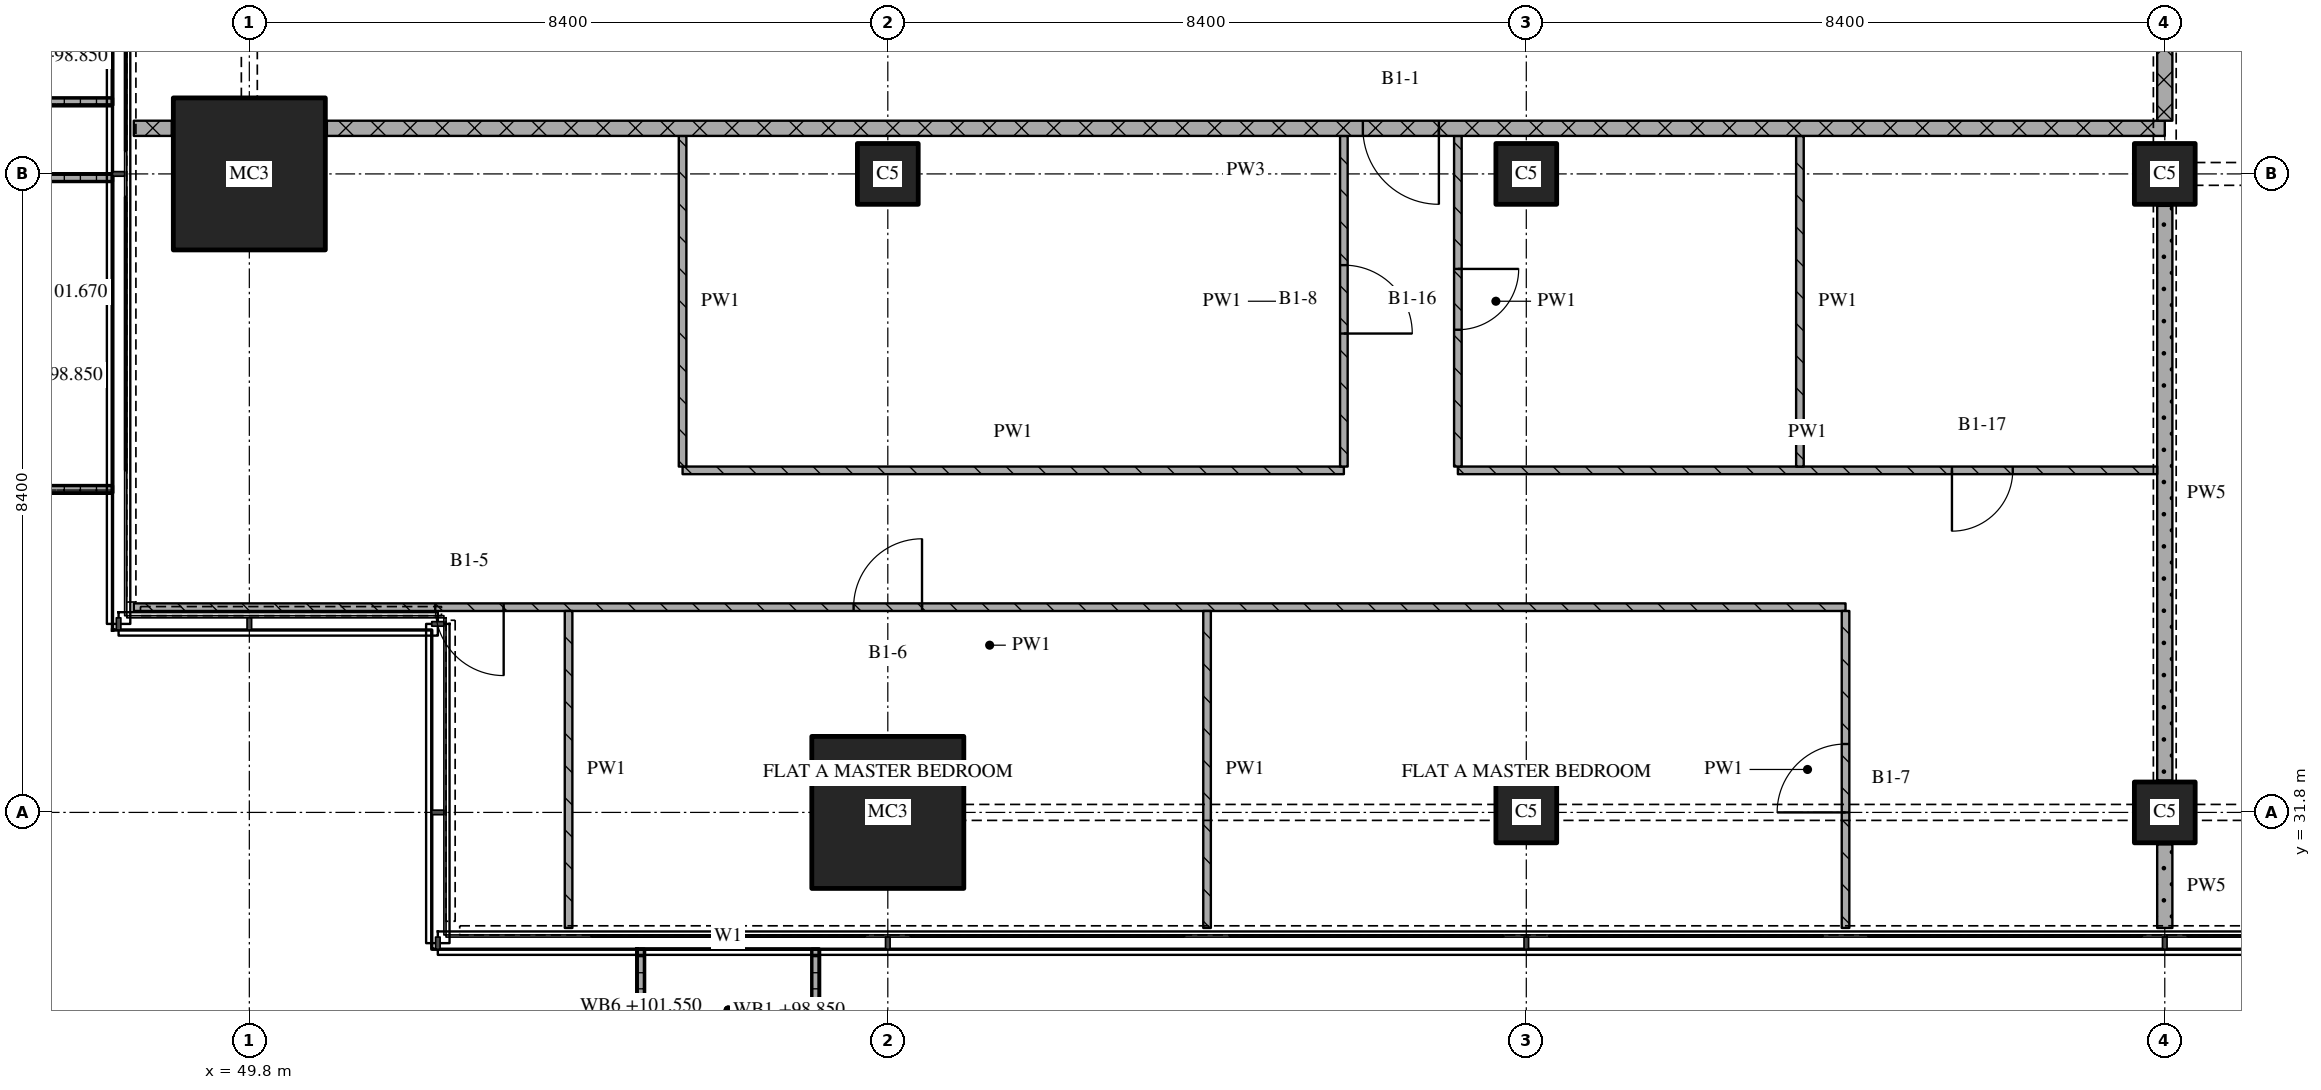
"""IFC4 building model, lengths in metres.
Left out: names, types, materials, properties, quantities, classifications, styles, units other than length and angle.
Written with IfcOpenShell. Run it as: python <this file> out.ifc"""

import sys

from ifc_helpers import new_model, si_unit, direction, frame, frame_2d, origin, origin_2d, place, context, subcontext, project, spatial, polyline, rectangle, outline, extrude, element, fill, save


model = new_model("IFC4")
c1 = context("Model", 3, precision=1e-05, world=origin(), true_north=direction((0.0, 1.0)))
c2 = subcontext(c1, "Body", "Model", "MODEL_VIEW")
j1 = project(units=[si_unit("LENGTHUNIT", "METRE"), si_unit("PLANEANGLEUNIT", "RADIAN")], contexts=[c1])
p1 = place(None, origin())
s1 = spatial("IfcSite", under=j1, at=p1, CompositionType="ELEMENT")
p2 = place(p1, origin())
s2 = spatial("IfcBuilding", under=s1, at=p2, CompositionType="ELEMENT")
p3 = place(p2, frame((0.0, 0.0, 98.85)))
s3 = spatial("IfcBuildingStorey", under=s2, at=p3, CompositionType="ELEMENT", Elevation=98.85)
for number, where, z_axis, x_axis in (
    (1, (49.8, 40.2, 0.0), (0.0, 0.0, 1.0), (1.0, 0.0, 0.0)),
    (2, (58.2, 31.8, 0.0), (0.0, 0.0, 1.0), (1.0, 0.0, 0.0)),
):
    element("IfcColumn", number, at=place(p3, frame(where, z_axis=z_axis, x_axis=x_axis)), inside=s3, PredefinedType="COLUMN", context=c2, shape_type="SweptSolid", body=[
        extrude(rectangle(XDim=2.0, YDim=2.0, at=origin_2d()), origin(), (0.0, 0.0, 1.0), 3.6),
    ])
for number, where, z_axis, x_axis in (
    (3, (58.2, 40.2, 0.0), (0.0, 0.0, 1.0), (1.0, 0.0, 0.0)),
    (4, (66.6, 31.8, 0.0), (0.0, 0.0, 1.0), (1.0, 0.0, 0.0)),
    (5, (66.6, 40.2, 0.0), (0.0, 0.0, 1.0), (1.0, 0.0, 0.0)),
    (6, (75.0, 31.8, 0.0), (0.0, 0.0, 1.0), (1.0, 0.0, 0.0)),
    (7, (75.0, 40.2, 0.0), (0.0, 0.0, 1.0), (1.0, 0.0, 0.0)),
):
    element("IfcColumn", number, at=place(p3, frame(where, z_axis=z_axis, x_axis=x_axis)), inside=s3, PredefinedType="COLUMN", context=c2, shape_type="SweptSolid", body=[
        extrude(rectangle(XDim=0.8, YDim=0.8, at=origin_2d()), origin(), (0.0, 0.0, 1.0), 3.6),
    ])
p4 = place(p3, origin())
e8 = element("IfcWall", 8, at=p4, inside=s3, PredefinedType="SOLIDWALL", context=c2, shape_type="SweptSolid", body=[
    extrude(outline(polyline([(54.9, 30.0), (55.0, 30.0), (55.0, 28.5), (57.2, 28.5), (57.2, 30.0), (57.3, 30.0), (57.3, 28.4), (54.9, 28.4), (54.9, 30.0)])), origin(), (0.0, 0.0, 1.0), 1.0),
])
p5 = place(p3, origin())
e9 = element("IfcWall", 9, at=p5, inside=s3, PredefinedType="SOLIDWALL", context=c2, shape_type="SweptSolid", body=[
    extrude(outline(polyline([(48.0, 43.5), (48.0, 43.4), (46.5, 43.4), (46.5, 41.2), (48.0, 41.2), (48.0, 41.1), (46.4, 41.1), (46.4, 43.5), (48.0, 43.5)])), origin(), (0.0, 0.0, 1.0), 1.0),
])
p6 = place(p3, origin())
e10 = element("IfcWall", 10, at=p6, inside=s3, PredefinedType="SOLIDWALL", context=c2, shape_type="SweptSolid", body=[
    extrude(outline(polyline([(48.0, 40.2), (48.0, 40.1), (46.367, 40.1), (46.367, 36.1), (48.0, 36.1), (48.0, 36.0), (46.267, 36.0), (46.267, 40.2), (48.0, 40.2)])), origin(), (0.0, 0.0, 1.0), 1.0),
])
p7 = place(p3, frame((70.8, 34.5, 0.0), z_axis=(0.0, 0.0, 1.0), x_axis=(-1.0, 0.0, 0.0)))
e11 = element("IfcWall", 11, at=p7, inside=s3, PredefinedType="PARTITIONING", context=c2, shape_type="SweptSolid", body=[
    extrude(rectangle(XDim=22.52, YDim=0.1, at=frame_2d((11.26, 0.0))), origin(), (0.0, 0.0, 1.0), 3.32),
])
p8 = place(p7, frame((12.15, 0.0, 0.0)))
e12 = element("IfcOpeningElement", 12, at=p8, cuts=e11, PredefinedType="OPENING", context=c2, shape_type="SweptSolid", body=[
    extrude(rectangle(XDim=0.9, YDim=2.1, at=frame_2d((0.45, 1.05))), frame((0.0, 0.06, 0.0), z_axis=(0.0, -1.0, 0.0), x_axis=(1.0, 0.0, 0.0)), (0.0, 0.0, 1.0), 0.12),
])
p9 = place(p7, frame((17.654, 0.0, 0.0)))
e13 = element("IfcOpeningElement", 13, at=p9, cuts=e11, PredefinedType="OPENING", context=c2, shape_type="SweptSolid", body=[
    extrude(rectangle(XDim=0.9, YDim=2.1, at=frame_2d((0.45, 1.05))), frame((0.0, 0.06, 0.0), z_axis=(0.0, -1.0, 0.0), x_axis=(1.0, 0.0, 0.0)), (0.0, 0.0, 1.0), 0.12),
])
p10 = place(p3, frame((55.5, 36.3, 0.0), z_axis=(0.0, 0.0, 1.0), x_axis=(1.0, 0.0, 0.0)))
e14 = element("IfcWall", 14, at=p10, inside=s3, PredefinedType="PARTITIONING", context=c2, shape_type="SweptSolid", body=[
    extrude(rectangle(XDim=8.7, YDim=0.1, at=frame_2d((4.35, 0.0))), origin(), (0.0, 0.0, 1.0), 3.32),
])
p11 = place(p3, frame((65.7, 36.3, 0.0), z_axis=(0.0, 0.0, 1.0), x_axis=(1.0, 0.0, 0.0)))
e15 = element("IfcWall", 15, at=p11, inside=s3, PredefinedType="PARTITIONING", context=c2, shape_type="SweptSolid", body=[
    extrude(rectangle(XDim=9.2, YDim=0.1, at=frame_2d((4.6, 0.0))), origin(), (0.0, 0.0, 1.0), 3.32),
])
p12 = place(p11, frame((6.5, 0.0, 0.0)))
e16 = element("IfcOpeningElement", 16, at=p12, cuts=e15, PredefinedType="OPENING", context=c2, shape_type="SweptSolid", body=[
    extrude(rectangle(XDim=0.8, YDim=2.1, at=frame_2d((0.4, 1.05))), frame((0.0, 0.06, 0.0), z_axis=(0.0, -1.0, 0.0), x_axis=(1.0, 0.0, 0.0)), (0.0, 0.0, 1.0), 0.12),
])
p13 = place(p3, frame((48.28, 40.8, 0.0), z_axis=(0.0, 0.0, 1.0), x_axis=(1.0, 0.0, 0.0)))
e17 = element("IfcWall", 17, at=p13, inside=s3, PredefinedType="PARTITIONING", context=c2, shape_type="SweptSolid", body=[
    extrude(rectangle(XDim=0.5, YDim=0.2, at=frame_2d((0.25, 0.0))), origin(), (0.0, 0.0, 1.0), 3.32),
])
p14 = place(p3, frame((75.0, 40.8, 0.0), z_axis=(0.0, 0.0, 1.0), x_axis=(-1.0, 0.0, 0.0)))
e18 = element("IfcWall", 18, at=p14, inside=s3, PredefinedType="PARTITIONING", context=c2, shape_type="SweptSolid", body=[
    extrude(rectangle(XDim=24.18, YDim=0.2, at=frame_2d((12.09, 0.0))), origin(), (0.0, 0.0, 1.0), 3.32),
])
p15 = place(p14, frame((9.55, 0.0, 0.0)))
e19 = element("IfcOpeningElement", 19, at=p15, cuts=e18, PredefinedType="OPENING", context=c2, shape_type="SweptSolid", body=[
    extrude(rectangle(XDim=1.0, YDim=2.1, at=frame_2d((0.5, 1.05))), frame((0.0, 0.11, 0.0), z_axis=(0.0, -1.0, 0.0), x_axis=(1.0, 0.0, 0.0)), (0.0, 0.0, 1.0), 0.22),
])
p16 = place(p3, frame((54.0, 34.45, 0.0), z_axis=(0.0, 0.0, 1.0), x_axis=(0.0, -1.0, 0.0)))
e20 = element("IfcWall", 20, at=p16, inside=s3, PredefinedType="PARTITIONING", context=c2, shape_type="SweptSolid", body=[
    extrude(rectangle(XDim=4.17, YDim=0.1, at=frame_2d((2.085, 0.0))), origin(), (0.0, 0.0, 1.0), 3.32),
])
p17 = place(p3, frame((55.5, 40.7, 0.0), z_axis=(0.0, 0.0, 1.0), x_axis=(0.0, -1.0, 0.0)))
e21 = element("IfcWall", 21, at=p17, inside=s3, PredefinedType="PARTITIONING", context=c2, shape_type="SweptSolid", body=[
    extrude(rectangle(XDim=4.35, YDim=0.1, at=frame_2d((2.175, 0.0))), origin(), (0.0, 0.0, 1.0), 3.32),
])
p18 = place(p3, frame((62.4, 34.45, 0.0), z_axis=(0.0, 0.0, 1.0), x_axis=(0.0, -1.0, 0.0)))
e22 = element("IfcWall", 22, at=p18, inside=s3, PredefinedType="PARTITIONING", context=c2, shape_type="SweptSolid", body=[
    extrude(rectangle(XDim=4.17, YDim=0.1, at=frame_2d((2.085, 0.0))), origin(), (0.0, 0.0, 1.0), 3.32),
])
p19 = place(p3, frame((64.2, 36.35, 0.0), z_axis=(0.0, 0.0, 1.0), x_axis=(0.0, 1.0, 0.0)))
e23 = element("IfcWall", 23, at=p19, inside=s3, PredefinedType="PARTITIONING", context=c2, shape_type="SweptSolid", body=[
    extrude(rectangle(XDim=4.35, YDim=0.1, at=frame_2d((2.175, 0.0))), origin(), (0.0, 0.0, 1.0), 3.32),
])
p20 = place(p19, frame((1.75, 0.0, 0.0)))
e24 = element("IfcOpeningElement", 24, at=p20, cuts=e23, PredefinedType="OPENING", context=c2, shape_type="SweptSolid", body=[
    extrude(rectangle(XDim=0.9, YDim=2.1, at=frame_2d((0.45, 1.05))), frame((0.0, 0.06, 0.0), z_axis=(0.0, -1.0, 0.0), x_axis=(1.0, 0.0, 0.0)), (0.0, 0.0, 1.0), 0.12),
])
p21 = place(p3, frame((65.7, 40.7, 0.0), z_axis=(0.0, 0.0, 1.0), x_axis=(0.0, -1.0, 0.0)))
e25 = element("IfcWall", 25, at=p21, inside=s3, PredefinedType="PARTITIONING", context=c2, shape_type="SweptSolid", body=[
    extrude(rectangle(XDim=4.35, YDim=0.1, at=frame_2d((2.175, 0.0))), origin(), (0.0, 0.0, 1.0), 3.32),
])
p22 = place(p21, frame((1.75, 0.0, 0.0)))
e26 = element("IfcOpeningElement", 26, at=p22, cuts=e25, PredefinedType="OPENING", context=c2, shape_type="SweptSolid", body=[
    extrude(rectangle(XDim=0.8, YDim=2.1, at=frame_2d((0.4, 1.05))), frame((0.0, 0.06, 0.0), z_axis=(0.0, -1.0, 0.0), x_axis=(1.0, 0.0, 0.0)), (0.0, 0.0, 1.0), 0.12),
])
p23 = place(p3, frame((70.2, 40.7, 0.0), z_axis=(0.0, 0.0, 1.0), x_axis=(0.0, -1.0, 0.0)))
e27 = element("IfcWall", 27, at=p23, inside=s3, PredefinedType="PARTITIONING", context=c2, shape_type="SweptSolid", body=[
    extrude(rectangle(XDim=4.35, YDim=0.1, at=frame_2d((2.175, 0.0))), origin(), (0.0, 0.0, 1.0), 3.32),
])
p24 = place(p3, frame((70.8, 30.28, 0.0), z_axis=(0.0, 0.0, 1.0), x_axis=(0.0, 1.0, 0.0)))
e28 = element("IfcWall", 28, at=p24, inside=s3, PredefinedType="PARTITIONING", context=c2, shape_type="SweptSolid", body=[
    extrude(rectangle(XDim=4.17, YDim=0.1, at=frame_2d((2.085, 0.0))), origin(), (0.0, 0.0, 1.0), 3.32),
])
p25 = place(p24, frame((1.52, 0.0, 0.0)))
e29 = element("IfcOpeningElement", 29, at=p25, cuts=e28, PredefinedType="OPENING", context=c2, shape_type="SweptSolid", body=[
    extrude(rectangle(XDim=0.9, YDim=2.1, at=frame_2d((0.45, 1.05))), frame((0.0, 0.06, 0.0), z_axis=(0.0, -1.0, 0.0), x_axis=(1.0, 0.0, 0.0)), (0.0, 0.0, 1.0), 0.12),
])
p26 = place(p3, frame((75.0, 43.1, 0.0), z_axis=(0.0, 0.0, 1.0), x_axis=(0.0, -1.0, 0.0)))
e30 = element("IfcWall", 30, at=p26, inside=s3, PredefinedType="PARTITIONING", context=c2, shape_type="SweptSolid", body=[
    extrude(rectangle(XDim=2.2, YDim=0.2, at=frame_2d((1.1, 0.0))), origin(), (0.0, 0.0, 1.0), 2.43),
])
p27 = place(p3, frame((75.0, 31.38, 0.0), z_axis=(0.0, 0.0, 1.0), x_axis=(0.0, -1.0, 0.0)))
e31 = element("IfcWall", 31, at=p27, inside=s3, PredefinedType="PARTITIONING", context=c2, shape_type="SweptSolid", body=[
    extrude(rectangle(XDim=1.1, YDim=0.2, at=frame_2d((0.55, 0.0))), origin(), (0.0, 0.0, 1.0), 3.32),
])
p28 = place(p3, frame((75.0, 39.78, 0.0), z_axis=(0.0, 0.0, 1.0), x_axis=(0.0, -1.0, 0.0)))
e32 = element("IfcWall", 32, at=p28, inside=s3, PredefinedType="PARTITIONING", context=c2, shape_type="SweptSolid", body=[
    extrude(rectangle(XDim=7.56, YDim=0.2, at=frame_2d((3.78, 0.0))), origin(), (0.0, 0.0, 1.0), 2.83),
])
p29 = place(p8, origin())
e33 = element("IfcDoor", 33, at=p29, inside=s3, OperationType="SINGLE_SWING_RIGHT", PredefinedType="DOOR", context=c2, shape_type="SweptSolid", body=[
    extrude(rectangle(XDim=0.9, YDim=2.1, at=frame_2d((0.45, 1.05))), frame((0.0, 0.025, 0.0), z_axis=(0.0, -1.0, 0.0), x_axis=(1.0, 0.0, 0.0)), (0.0, 0.0, 1.0), 0.05),
])
fill(e12, e33)
p30 = place(p9, origin())
e34 = element("IfcDoor", 34, at=p30, inside=s3, OperationType="SINGLE_SWING_LEFT", PredefinedType="DOOR", context=c2, shape_type="SweptSolid", body=[
    extrude(rectangle(XDim=0.9, YDim=2.1, at=frame_2d((0.45, 1.05))), frame((0.0, 0.025, 0.0), z_axis=(0.0, -1.0, 0.0), x_axis=(1.0, 0.0, 0.0)), (0.0, 0.0, 1.0), 0.05),
])
fill(e13, e34)
p31 = place(p12, origin())
e35 = element("IfcDoor", 35, at=p31, inside=s3, OperationType="SINGLE_SWING_RIGHT", PredefinedType="DOOR", context=c2, shape_type="SweptSolid", body=[
    extrude(rectangle(XDim=0.8, YDim=2.1, at=frame_2d((0.4, 1.05))), frame((0.0, 0.025, 0.0), z_axis=(0.0, -1.0, 0.0), x_axis=(1.0, 0.0, 0.0)), (0.0, 0.0, 1.0), 0.05),
])
fill(e16, e35)
p32 = place(p15, origin())
e36 = element("IfcDoor", 36, at=p32, inside=s3, OperationType="SINGLE_SWING_LEFT", PredefinedType="DOOR", context=c2, shape_type="SweptSolid", body=[
    extrude(rectangle(XDim=1.0, YDim=2.1, at=frame_2d((0.5, 1.05))), frame((0.0, 0.025, 0.0), z_axis=(0.0, -1.0, 0.0), x_axis=(1.0, 0.0, 0.0)), (0.0, 0.0, 1.0), 0.05),
])
fill(e19, e36)
p33 = place(p20, origin())
e37 = element("IfcDoor", 37, at=p33, inside=s3, OperationType="SINGLE_SWING_RIGHT", PredefinedType="DOOR", context=c2, shape_type="SweptSolid", body=[
    extrude(rectangle(XDim=0.9, YDim=2.1, at=frame_2d((0.45, 1.05))), frame((0.0, 0.025, 0.0), z_axis=(0.0, -1.0, 0.0), x_axis=(1.0, 0.0, 0.0)), (0.0, 0.0, 1.0), 0.05),
])
fill(e24, e37)
p34 = place(p22, origin())
e38 = element("IfcDoor", 38, at=p34, inside=s3, OperationType="SINGLE_SWING_LEFT", PredefinedType="DOOR", context=c2, shape_type="SweptSolid", body=[
    extrude(rectangle(XDim=0.8, YDim=2.1, at=frame_2d((0.4, 1.05))), frame((0.0, 0.025, 0.0), z_axis=(0.0, -1.0, 0.0), x_axis=(1.0, 0.0, 0.0)), (0.0, 0.0, 1.0), 0.05),
])
fill(e26, e38)
p35 = place(p25, origin())
e39 = element("IfcDoor", 39, at=p35, inside=s3, OperationType="SINGLE_SWING_LEFT", PredefinedType="DOOR", context=c2, shape_type="SweptSolid", body=[
    extrude(rectangle(XDim=0.9, YDim=2.1, at=frame_2d((0.45, 1.05))), frame((0.0, 0.025, 0.0), z_axis=(0.0, -1.0, 0.0), x_axis=(1.0, 0.0, 0.0)), (0.0, 0.0, 1.0), 0.05),
])
fill(e29, e39)
save(model, sys.argv[1])
